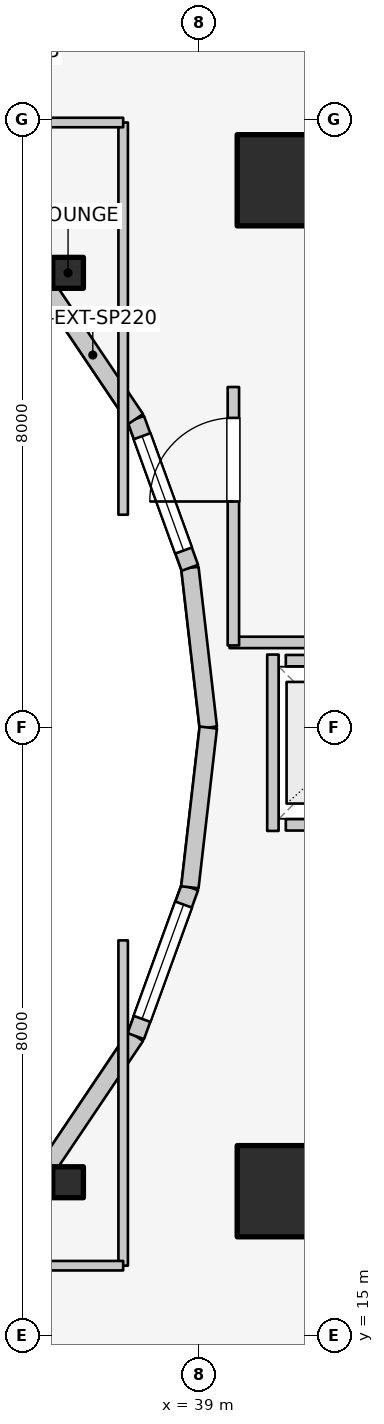
"""IFC4 building model, lengths in metres.
Left out: names, types, materials, properties, quantities, classifications, styles, units other than length and angle.
Written with IfcOpenShell. Run it as: python <this file> out.ifc"""

import sys

from ifc_helpers import new_model, si_unit, direction, frame, frame_2d, origin, origin_2d, place, context, subcontext, project, spatial, rectangle, i_section, extrude, element, fill, save


model = new_model("IFC4")
c1 = context("Model", 3, precision=1e-05, world=origin(), true_north=direction((0.0, 1.0)))
c2 = subcontext(c1, "Body", "Model", "MODEL_VIEW")
j1 = project(units=[si_unit("LENGTHUNIT", "METRE"), si_unit("PLANEANGLEUNIT", "RADIAN")], contexts=[c1])
p1 = place(None, origin())
s1 = spatial("IfcSite", under=j1, at=p1, CompositionType="ELEMENT")
p2 = place(p1, origin())
s2 = spatial("IfcBuilding", under=s1, at=p2, CompositionType="ELEMENT")
p3 = place(p2, frame((0.0, 0.0, 256.8)))
s3 = spatial("IfcBuildingStorey", under=s2, at=p3, CompositionType="ELEMENT", Elevation=256.8)
for number, where, z_axis, x_axis in (
    (1, (39.85, 16.55, 0.0), (0.0, 0.0, 1.0), (1.0, 0.0, 0.0)),
    (2, (39.85, 30.35, 0.0), (0.0, 0.0, 1.0), (1.0, 0.0, 0.0)),
):
    element("IfcWall", number, at=place(p3, frame(where, z_axis=z_axis, x_axis=x_axis)), inside=s3, PredefinedType="SHEAR", context=c2, shape_type="SweptSolid", body=[
        extrude(rectangle(XDim=4.5, YDim=0.45, at=frame_2d((2.25, 0.0))), origin(), (0.0, 0.0, 1.0), 3.6),
    ])
for number, where, z_axis, x_axis in (
    (3, (40.1, 16.9, 0.0), (0.0, 0.0, 1.0), (1.0, 0.0, 0.0)),
    (4, (40.1, 30.2, 0.0), (0.0, 0.0, 1.0), (1.0, 0.0, 0.0)),
):
    element("IfcColumn", number, at=place(p3, frame(where, z_axis=z_axis, x_axis=x_axis)), inside=s3, PredefinedType="COLUMN", context=c2, shape_type="SweptSolid", body=[
        extrude(rectangle(XDim=1.2, YDim=1.2, at=origin_2d()), origin(), (0.0, 0.0, 1.0), 3.6),
    ])
for number, where, z_axis, x_axis in (
    (5, (37.275, 28.982, 0.0), (0.0, 0.0, 1.0), (1.0, 0.0, 0.0)),
    (6, (37.275, 17.018, 0.0), (0.0, 0.0, 1.0), (1.0, 0.0, 0.0)),
):
    element("IfcColumn", number, at=place(p3, frame(where, z_axis=z_axis, x_axis=x_axis)), inside=s3, PredefinedType="COLUMN", context=c2, shape_type="SweptSolid", body=[
        extrude(i_section(OverallWidth=0.404, OverallDepth=0.407, WebThickness=0.027, FlangeThickness=0.044, FilletRadius=0.025, at=origin_2d()), origin(), (0.0, 0.0, 1.0), 3.6),
    ])
p4 = place(p3, frame((39.12, 23.0, 0.0), z_axis=(0.0, 0.0, 1.0), x_axis=(-0.114711713601, 0.993398823617, 0.0)))
e7 = element("IfcWall", 7, at=p4, inside=s3, PredefinedType="STANDARD", context=c2, shape_type="SweptSolid", body=[
    extrude(rectangle(XDim=2.115, YDim=0.23, at=frame_2d((1.058, 0.0))), origin(), (0.0, 0.0, 1.0), 3.06),
])
p5 = place(p3, frame((38.877, 25.102, 0.0), z_axis=(0.0, 0.0, 1.0), x_axis=(-0.341423187295, 0.93990968033, 0.0)))
e8 = element("IfcWall", 8, at=p5, inside=s3, PredefinedType="STANDARD", context=c2, shape_type="SweptSolid", body=[
    extrude(rectangle(XDim=2.084, YDim=0.23, at=frame_2d((1.042, 0.0))), origin(), (0.0, 0.0, 1.0), 3.06),
])
p6 = place(p5, frame((0.242, 0.0, 0.85)))
e9 = element("IfcOpeningElement", 9, at=p6, cuts=e8, PredefinedType="OPENING", context=c2, shape_type="SweptSolid", body=[
    extrude(rectangle(XDim=1.6, YDim=1.65, at=frame_2d((0.8, 0.825))), frame((0.0, 0.125, 0.0), z_axis=(0.0, -1.0, 0.0), x_axis=(1.0, 0.0, 0.0)), (0.0, 0.0, 1.0), 0.25),
])
p7 = place(p3, frame((38.166, 27.06, 0.0), z_axis=(0.0, 0.0, 1.0), x_axis=(-0.558197800898, 0.829707909492, 0.0)))
e10 = element("IfcWall", 10, at=p7, inside=s3, PredefinedType="STANDARD", context=c2, shape_type="SweptSolid", body=[
    extrude(rectangle(XDim=2.027, YDim=0.23, at=frame_2d((1.013, 0.0))), origin(), (0.0, 0.0, 1.0), 1.72),
])
for number, where, z_axis, x_axis in (
    (11, (37.035, 28.742, 0.0), (0.0, 0.0, 1.0), (-0.753, 0.659, 0.0)),
    (12, (35.56, 15.968, 0.0), (0.0, 0.0, 1.0), (0.753, 0.659, 0.0)),
):
    element("IfcWall", number, at=place(p3, frame(where, z_axis=z_axis, x_axis=x_axis)), inside=s3, PredefinedType="STANDARD", context=c2, shape_type="SweptSolid", body=[
        extrude(rectangle(XDim=1.959, YDim=0.23, at=frame_2d((0.98, 0.0))), origin(), (0.0, 0.0, 1.0), 1.72),
    ])
p8 = place(p3, frame((37.035, 17.258, 0.0), z_axis=(0.0, 0.0, 1.0), x_axis=(0.558197800898, 0.829707909492, 0.0)))
e13 = element("IfcWall", 13, at=p8, inside=s3, PredefinedType="STANDARD", context=c2, shape_type="SweptSolid", body=[
    extrude(rectangle(XDim=2.027, YDim=0.23, at=frame_2d((1.013, 0.0))), origin(), (0.0, 0.0, 1.0), 1.72),
])
p9 = place(p3, frame((38.166, 18.94, 0.0), z_axis=(0.0, 0.0, 1.0), x_axis=(0.341423187295, 0.93990968033, 0.0)))
e14 = element("IfcWall", 14, at=p9, inside=s3, PredefinedType="STANDARD", context=c2, shape_type="SweptSolid", body=[
    extrude(rectangle(XDim=2.084, YDim=0.23, at=frame_2d((1.042, 0.0))), origin(), (0.0, 0.0, 1.0), 3.06),
])
p10 = place(p9, frame((0.242, 0.0, 0.85)))
e15 = element("IfcOpeningElement", 15, at=p10, cuts=e14, PredefinedType="OPENING", context=c2, shape_type="SweptSolid", body=[
    extrude(rectangle(XDim=1.6, YDim=1.65, at=frame_2d((0.8, 0.825))), frame((0.0, 0.125, 0.0), z_axis=(0.0, -1.0, 0.0), x_axis=(1.0, 0.0, 0.0)), (0.0, 0.0, 1.0), 0.25),
])
p11 = place(p3, frame((38.877, 20.898, 0.0), z_axis=(0.0, 0.0, 1.0), x_axis=(0.114711713601, 0.993398823617, 0.0)))
e16 = element("IfcWall", 16, at=p11, inside=s3, PredefinedType="STANDARD", context=c2, shape_type="SweptSolid", body=[
    extrude(rectangle(XDim=2.115, YDim=0.23, at=frame_2d((1.058, 0.0))), origin(), (0.0, 0.0, 1.0), 3.06),
])
p12 = place(p3, frame((40.14, 21.72, 0.0), z_axis=(0.0, 0.0, 1.0), x_axis=(1.0, 0.0, 0.0)))
e17 = element("IfcWall", 17, at=p12, inside=s3, PredefinedType="SOLIDWALL", context=c2, shape_type="SweptSolid", body=[
    extrude(rectangle(XDim=1.82, YDim=0.15, at=frame_2d((0.91, 0.0))), origin(), (0.0, 0.0, 1.0), 2.62),
])
p13 = place(p12, frame((0.36, 0.0, 0.0)))
e18 = element("IfcOpeningElement", 18, at=p13, cuts=e17, PredefinedType="OPENING", context=c2, shape_type="SweptSolid", body=[
    extrude(rectangle(XDim=1.1, YDim=2.1, at=frame_2d((0.55, 1.05))), frame((0.0, 0.085, 0.0), z_axis=(0.0, -1.0, 0.0), x_axis=(1.0, 0.0, 0.0)), (0.0, 0.0, 1.0), 0.17),
])
p14 = place(p3, frame((40.14, 23.88, 0.0), z_axis=(0.0, 0.0, 1.0), x_axis=(1.0, 0.0, 0.0)))
e19 = element("IfcWall", 19, at=p14, inside=s3, PredefinedType="SOLIDWALL", context=c2, shape_type="SweptSolid", body=[
    extrude(rectangle(XDim=1.82, YDim=0.15, at=frame_2d((0.91, 0.0))), origin(), (0.0, 0.0, 1.0), 2.62),
])
p15 = place(p3, frame((39.97, 21.64, 0.0), z_axis=(0.0, 0.0, 1.0), x_axis=(0.0, 1.0, 0.0)))
e20 = element("IfcWall", 20, at=p15, inside=s3, PredefinedType="SOLIDWALL", context=c2, shape_type="SweptSolid", body=[
    extrude(rectangle(XDim=2.32, YDim=0.15, at=frame_2d((1.16, 0.0))), origin(), (0.0, 0.0, 1.0), 2.62),
])
p16 = place(p3, frame((39.4, 24.12, 0.0), z_axis=(0.0, 0.0, 1.0), x_axis=(1.0, 0.0, 0.0)))
e21 = element("IfcWall", 21, at=p16, inside=s3, PredefinedType="PARTITIONING", context=c2, shape_type="SweptSolid", body=[
    extrude(rectangle(XDim=5.08, YDim=0.15, at=frame_2d((2.54, 0.0))), origin(), (0.0, 0.0, 1.0), 2.62),
])
p17 = place(p3, frame((39.45, 24.08, 0.0), z_axis=(0.0, 0.0, 1.0), x_axis=(0.0, 1.0, 0.0)))
e22 = element("IfcWall", 22, at=p17, inside=s3, PredefinedType="PARTITIONING", context=c2, shape_type="SweptSolid", body=[
    extrude(rectangle(XDim=3.4, YDim=0.15, at=frame_2d((1.7, 0.0))), origin(), (0.0, 0.0, 1.0), 3.075),
])
p18 = place(p17, frame((1.894, 0.0, 0.0)))
e23 = element("IfcOpeningElement", 23, at=p18, cuts=e22, PredefinedType="OPENING", context=c2, shape_type="SweptSolid", body=[
    extrude(rectangle(XDim=1.1, YDim=2.1, at=frame_2d((0.55, 1.05))), frame((0.0, 0.085, 0.0), z_axis=(0.0, -1.0, 0.0), x_axis=(1.0, 0.0, 0.0)), (0.0, 0.0, 1.0), 0.17),
])
p19 = place(p3, frame((35.55, 30.015, 0.0), z_axis=(0.0, 0.0, 1.0), x_axis=(0.522763432117, 0.852477796802, 0.0)))
e24 = element("IfcWall", 24, at=p19, inside=s3, PredefinedType="PARTITIONING", context=c2, shape_type="SweptSolid", body=[
    extrude(rectangle(XDim=3.269, YDim=0.125, at=frame_2d((1.635, 0.0))), origin(), (0.0, 0.0, 1.0), 1.72),
])
p20 = place(p3, frame((35.55, 15.985, 0.0), z_axis=(0.0, 0.0, 1.0), x_axis=(0.52592395012, -0.850531597702, 0.0)))
e25 = element("IfcWall", 25, at=p20, inside=s3, PredefinedType="PARTITIONING", context=c2, shape_type="SweptSolid", body=[
    extrude(rectangle(XDim=2.869, YDim=0.125, at=frame_2d((1.435, 0.0))), origin(), (0.0, 0.0, 1.0), 1.72),
])
p21 = place(p3, frame((38.0, 25.8, 0.0), z_axis=(0.0, 0.0, 1.0), x_axis=(0.0, 1.0, 0.0)))
e26 = element("IfcWall", 26, at=p21, inside=s3, PredefinedType="PARTITIONING", context=c2, shape_type="SweptSolid", body=[
    extrude(rectangle(XDim=5.16, YDim=0.125, at=frame_2d((2.58, 0.0))), origin(), (0.0, 0.0, 1.0), 2.452),
])
p22 = place(p3, frame((35.4, 30.96, 0.0), z_axis=(0.0, 0.0, 1.0), x_axis=(1.0, 0.0, 0.0)))
e27 = element("IfcWall", 27, at=p22, inside=s3, PredefinedType="PARTITIONING", context=c2, shape_type="SweptSolid", body=[
    extrude(rectangle(XDim=2.6, YDim=0.125, at=frame_2d((1.3, 0.0))), origin(), (0.0, 0.0, 1.0), 1.72),
])
p23 = place(p3, frame((38.0, 15.92, 0.0), z_axis=(0.0, 0.0, 1.0), x_axis=(0.0, 1.0, 0.0)))
e28 = element("IfcWall", 28, at=p23, inside=s3, PredefinedType="PARTITIONING", context=c2, shape_type="SweptSolid", body=[
    extrude(rectangle(XDim=4.28, YDim=0.125, at=frame_2d((2.14, 0.0))), origin(), (0.0, 0.0, 1.0), 1.72),
])
p24 = place(p3, frame((35.4, 15.92, 0.0), z_axis=(0.0, 0.0, 1.0), x_axis=(1.0, 0.0, 0.0)))
e29 = element("IfcWall", 29, at=p24, inside=s3, PredefinedType="PARTITIONING", context=c2, shape_type="SweptSolid", body=[
    extrude(rectangle(XDim=2.6, YDim=0.125, at=frame_2d((1.3, 0.0))), origin(), (0.0, 0.0, 1.0), 1.72),
])
p25 = place(p6, origin())
e30 = element("IfcWindow", 30, at=p25, inside=s3, PartitioningType="SINGLE_PANEL", PredefinedType="WINDOW", context=c2, shape_type="SweptSolid", body=[
    extrude(rectangle(XDim=1.6, YDim=1.65, at=frame_2d((0.8, 0.825))), frame((0.0, 0.03, 0.0), z_axis=(0.0, -1.0, 0.0), x_axis=(1.0, 0.0, 0.0)), (0.0, 0.0, 1.0), 0.06),
])
fill(e9, e30)
p26 = place(p10, origin())
e31 = element("IfcWindow", 31, at=p26, inside=s3, PartitioningType="SINGLE_PANEL", PredefinedType="WINDOW", context=c2, shape_type="SweptSolid", body=[
    extrude(rectangle(XDim=1.6, YDim=1.65, at=frame_2d((0.8, 0.825))), frame((0.0, 0.03, 0.0), z_axis=(0.0, -1.0, 0.0), x_axis=(1.0, 0.0, 0.0)), (0.0, 0.0, 1.0), 0.06),
])
fill(e15, e31)
p27 = place(p18, origin())
e32 = element("IfcDoor", 32, at=p27, inside=s3, OperationType="SINGLE_SWING_LEFT", PredefinedType="DOOR", context=c2, shape_type="SweptSolid", body=[
    extrude(rectangle(XDim=1.1, YDim=2.1, at=frame_2d((0.55, 1.05))), frame((0.0, 0.025, 0.0), z_axis=(0.0, -1.0, 0.0), x_axis=(1.0, 0.0, 0.0)), (0.0, 0.0, 1.0), 0.05),
])
fill(e23, e32)
save(model, sys.argv[1])
